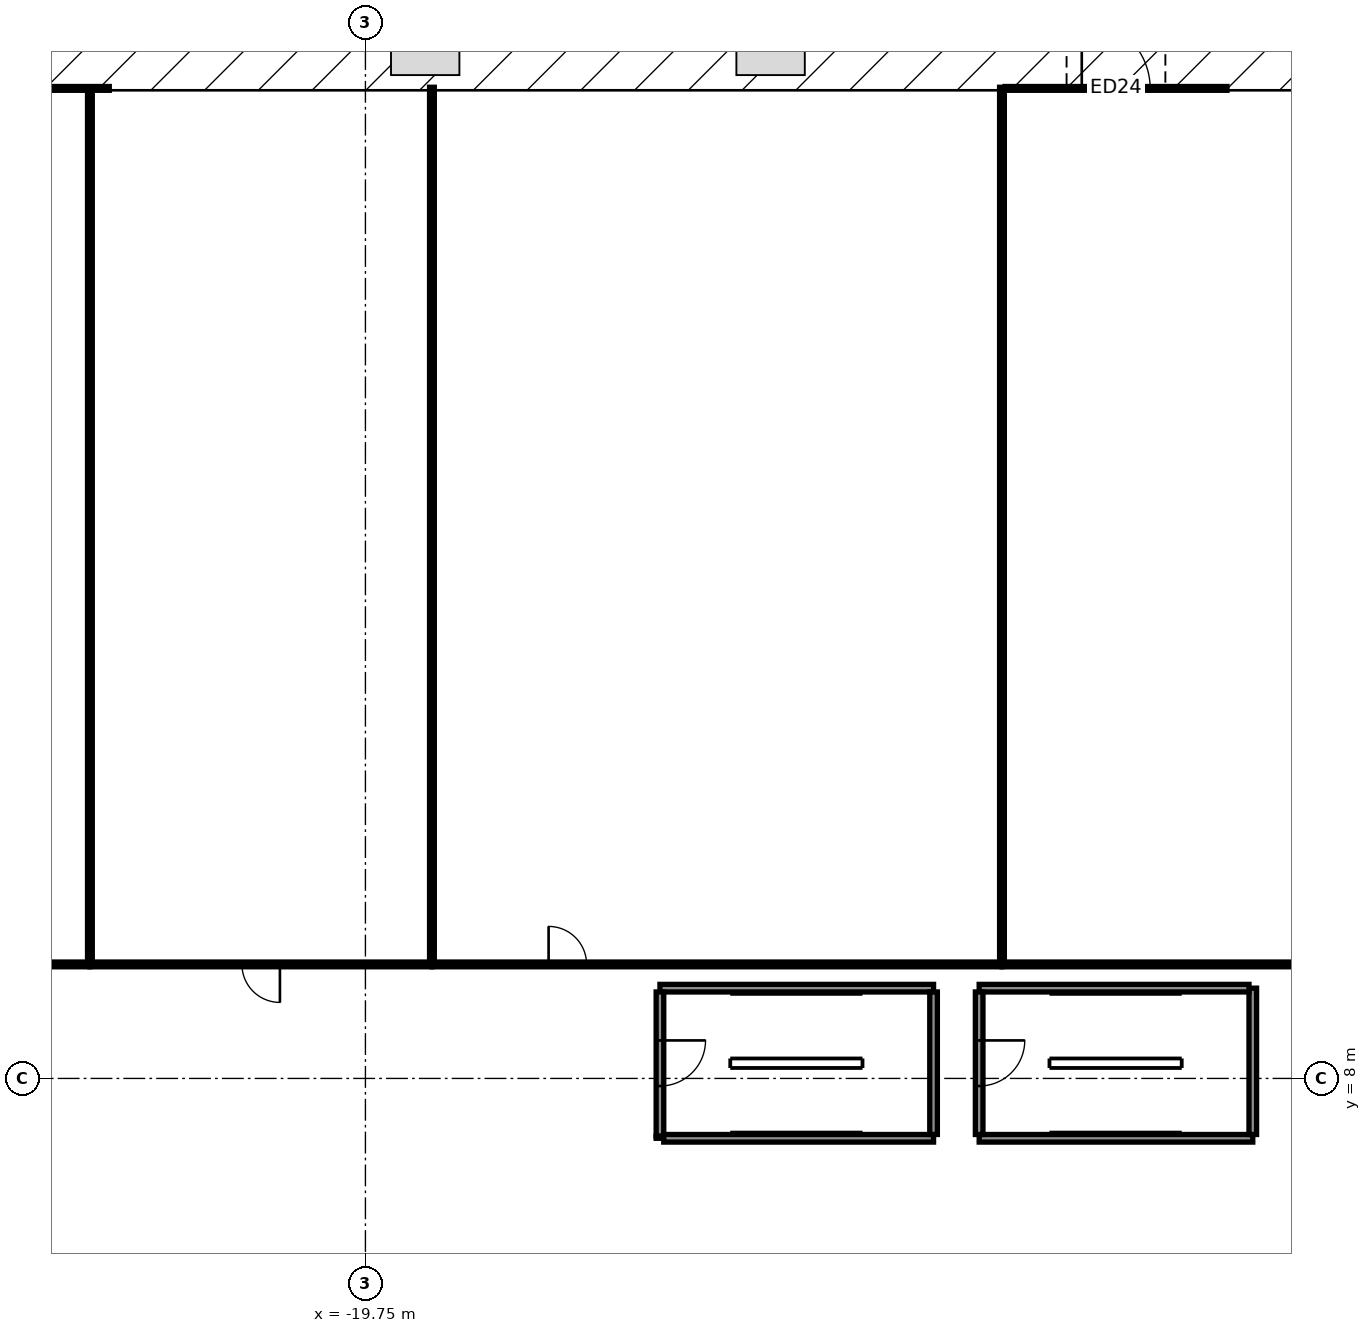
"""IFC4 building model, lengths in metres.
Left out: names, types, materials, properties, quantities, classifications, styles, units other than length and angle.
Written with IfcOpenShell. Run it as: python <this file> out.ifc"""

import sys

from ifc_helpers import new_model, si_unit, direction, frame, frame_2d, origin, origin_2d, place, context, subcontext, project, spatial, rectangle, hollow_rectangle, circle, extrude, element, fill, save


model = new_model("IFC4")
c1 = context("Model", 3, precision=1e-05, world=origin(), true_north=direction((0.0, 1.0)))
c2 = subcontext(c1, "Body", "Model", "MODEL_VIEW")
j1 = project(units=[si_unit("LENGTHUNIT", "METRE"), si_unit("PLANEANGLEUNIT", "RADIAN")], contexts=[c1])
p1 = place(None, origin())
s1 = spatial("IfcSite", under=j1, at=p1, CompositionType="ELEMENT")
p2 = place(p1, origin())
s2 = spatial("IfcBuilding", under=s1, at=p2, CompositionType="ELEMENT")
p3 = place(p2, frame((0.0, 0.0, 7.0)))
s3 = spatial("IfcBuildingStorey", under=s2, at=p3, CompositionType="ELEMENT", Elevation=7.0)
for number, where, z_axis, x_axis in (
    (1, (-21.0, 27.4, 0.0), (0.0, 0.0, 1.0), (1.0, 0.0, 0.0)),
    (2, (-4.2, 21.0, 0.0), (0.0, 0.0, 1.0), (1.0, 0.0, 0.0)),
    (3, (-4.2, 27.4, 0.0), (0.0, 0.0, 1.0), (1.0, 0.0, 0.0)),
    (4, (4.2, 4.2, 0.0), (0.0, 0.0, 1.0), (1.0, 0.0, 0.0)),
    (5, (4.2, 21.0, 0.0), (0.0, 0.0, 1.0), (1.0, 0.0, 0.0)),
    (6, (4.2, 27.4, 0.0), (0.0, 0.0, 1.0), (1.0, 0.0, 0.0)),
):
    element("IfcColumn", number, at=place(p3, frame(where, z_axis=z_axis, x_axis=x_axis)), inside=s3, PredefinedType="COLUMN", context=c2, shape_type="SweptSolid", body=[
        extrude(circle(Radius=0.6, at=origin_2d()), origin(), (0.0, 0.0, 1.0), 5.0),
    ])
for number, where, z_axis, x_axis in (
    (7, (-11.317, 11.797, 0.0), (0.0, 0.0, 1.0), (0.866, 0.5, 0.0)),
    (8, (-20.539, 19.418, 0.0), (0.0, 0.0, 1.0), (0.5, 0.866, 0.0)),
):
    element("IfcColumn", number, at=place(p3, frame(where, z_axis=z_axis, x_axis=x_axis)), inside=s3, PredefinedType="COLUMN", context=c2, shape_type="SweptSolid", body=[
        extrude(hollow_rectangle(XDim=1.5, YDim=1.5, WallThickness=0.07, at=origin_2d()), origin(), (0.0, 0.0, 1.0), 5.0),
    ])
p4 = place(p3, frame((-2.921, 34.05, 0.0), z_axis=(0.0, 0.0, 1.0), x_axis=(1.0, 0.0, 0.0)))
e9 = element("IfcWall", 9, at=p4, inside=s3, PredefinedType="STANDARD", context=c2, shape_type="SweptSolid", body=[
    extrude(rectangle(XDim=5.842, YDim=0.1, at=frame_2d((2.921, 0.0))), origin(), (0.0, 0.0, 1.0), 5.0),
])
p5 = place(p4, frame((2.021, 0.0, 0.0)))
e10 = element("IfcOpeningElement", 10, at=p5, cuts=e9, PredefinedType="OPENING", context=c2, shape_type="SweptSolid", body=[
    extrude(rectangle(XDim=1.8, YDim=2.4, at=frame_2d((0.9, 1.2))), frame((0.0, 0.06, 0.0), z_axis=(0.0, -1.0, 0.0), x_axis=(1.0, 0.0, 0.0)), (0.0, 0.0, 1.0), 0.12),
])
p6 = place(p3, frame((-32.333, 34.05, 0.0), z_axis=(0.0, 0.0, 1.0), x_axis=(1.0, 0.0, 0.0)))
e11 = element("IfcWall", 11, at=p6, inside=s3, PredefinedType="STANDARD", context=c2, shape_type="SweptSolid", body=[
    extrude(rectangle(XDim=5.843, YDim=0.1, at=frame_2d((2.921, 0.0))), origin(), (0.0, 0.0, 1.0), 5.0),
])
p7 = place(p6, frame((2.021, 0.0, 0.0)))
e12 = element("IfcOpeningElement", 12, at=p7, cuts=e11, PredefinedType="OPENING", context=c2, shape_type="SweptSolid", body=[
    extrude(rectangle(XDim=1.8, YDim=2.4, at=frame_2d((0.9, 1.2))), frame((0.0, 0.06, 0.0), z_axis=(0.0, -1.0, 0.0), x_axis=(1.0, 0.0, 0.0)), (0.0, 0.0, 1.0), 0.12),
])
p8 = place(p3, frame((-44.2, 8.0, 0.0), z_axis=(0.0, 0.0, 1.0), x_axis=(1.0, 0.0, 0.0)))
e13 = element("IfcWall", 13, at=p8, inside=s3, PredefinedType="SHEAR", context=c2, shape_type="SweptSolid", body=[
    extrude(rectangle(XDim=24.9, YDim=0.9, at=frame_2d((12.45, 0.0))), origin(), (0.0, 0.0, 1.0), 5.0),
])
p9 = place(p8, frame((10.5, 0.0, 0.0)))
e14 = element("IfcOpeningElement", 14, at=p9, cuts=e13, PredefinedType="OPENING", context=c2, shape_type="SweptSolid", body=[
    extrude(rectangle(XDim=1.1, YDim=2.1, at=frame_2d((0.55, 1.05))), frame((0.0, 0.46, 0.0), z_axis=(0.0, -1.0, 0.0), x_axis=(1.0, 0.0, 0.0)), (0.0, 0.0, 1.0), 0.92),
])
p10 = place(p8, frame((21.25, 0.0, 0.0)))
e15 = element("IfcOpeningElement", 15, at=p10, cuts=e13, PredefinedType="OPENING", context=c2, shape_type="SweptSolid", body=[
    extrude(rectangle(XDim=1.4, YDim=2.1, at=frame_2d((0.7, 1.05))), frame((0.0, 0.46, 0.0), z_axis=(0.0, -1.0, 0.0), x_axis=(1.0, 0.0, 0.0)), (0.0, 0.0, 1.0), 0.92),
])
p11 = place(p3, frame((-19.75, -8.0, 0.0), z_axis=(0.0, 0.0, 1.0), x_axis=(0.0, 1.0, 0.0)))
e16 = element("IfcWall", 16, at=p11, inside=s3, PredefinedType="SHEAR", context=c2, shape_type="SweptSolid", body=[
    extrude(rectangle(XDim=16.0, YDim=0.9, at=frame_2d((8.0, 0.0))), origin(), (0.0, 0.0, 1.0), 5.0),
])
p12 = place(p11, frame((7.1, 0.0, 0.0)))
e17 = element("IfcOpeningElement", 17, at=p12, cuts=e16, PredefinedType="OPENING", context=c2, shape_type="SweptSolid", body=[
    extrude(rectangle(XDim=1.8, YDim=2.1, at=frame_2d((0.9, 1.05))), frame((0.0, 0.46, 0.0), z_axis=(0.0, -1.0, 0.0), x_axis=(1.0, 0.0, 0.0)), (0.0, 0.0, 1.0), 0.92),
])
p13 = place(p3, frame((-43.3, 4.275, 0.0), z_axis=(0.0, 0.0, 1.0), x_axis=(1.0, 0.0, 0.0)))
e18 = element("IfcWall", 18, at=p13, inside=s3, PredefinedType="SHEAR", context=c2, shape_type="SweptSolid", body=[
    extrude(rectangle(XDim=23.1, YDim=0.25, at=frame_2d((11.55, 0.0))), origin(), (0.0, 0.0, 1.0), 5.0),
])
for number, where, z_axis, x_axis in (
    (19, (-27.858, 1.75, 0.0), (0.0, 0.0, 1.0), (0.0, 1.0, 0.0)),
    (20, (-25.264, 1.75, 0.0), (0.0, 0.0, 1.0), (0.0, 1.0, 0.0)),
    (21, (-22.669, 1.75, 0.0), (0.0, 0.0, 1.0), (0.0, 1.0, 0.0)),
):
    element("IfcWall", number, at=place(p3, frame(where, z_axis=z_axis, x_axis=x_axis)), inside=s3, PredefinedType="SHEAR", context=c2, shape_type="SweptSolid", body=[
        extrude(rectangle(XDim=2.4, YDim=0.25, at=frame_2d((1.2, 0.0))), origin(), (0.0, 0.0, 1.0), 5.0),
    ])
p14 = place(p3, frame((-27.575, 4.4, 0.0), z_axis=(0.0, 0.0, 1.0), x_axis=(0.0, 1.0, 0.0)))
e22 = element("IfcWall", 22, at=p14, inside=s3, PredefinedType="SHEAR", context=c2, shape_type="SweptSolid", body=[
    extrude(rectangle(XDim=3.15, YDim=0.25, at=frame_2d((1.575, 0.0))), origin(), (0.0, 0.0, 1.0), 5.0),
])
p15 = place(p3, frame((-24.425, 4.4, 0.0), z_axis=(0.0, 0.0, 1.0), x_axis=(0.0, 1.0, 0.0)))
e23 = element("IfcWall", 23, at=p15, inside=s3, PredefinedType="SHEAR", context=c2, shape_type="SweptSolid", body=[
    extrude(rectangle(XDim=3.15, YDim=0.25, at=frame_2d((1.575, 0.0))), origin(), (0.0, 0.0, 1.0), 5.0),
])
p16 = place(p15, frame((0.875, 0.0, 0.0)))
e24 = element("IfcOpeningElement", 24, at=p16, cuts=e23, PredefinedType="OPENING", context=c2, shape_type="SweptSolid", body=[
    extrude(rectangle(XDim=1.4, YDim=2.1, at=frame_2d((0.7, 1.05))), frame((0.0, 0.135, 0.0), z_axis=(0.0, -1.0, 0.0), x_axis=(1.0, 0.0, 0.0)), (0.0, 0.0, 1.0), 0.27),
])
p17 = place(p3, frame((-4.8, 10.375, 0.0), z_axis=(0.0, 0.0, 1.0), x_axis=(-1.0, 0.0, 0.0)))
e25 = element("IfcWall", 25, at=p17, inside=s3, PredefinedType="SOLIDWALL", context=c2, shape_type="SweptSolid", body=[
    extrude(rectangle(XDim=7.2, YDim=0.2, at=frame_2d((3.6, 0.0))), origin(), (0.0, 0.0, 1.0), 4.7),
])
p18 = place(p3, frame((-12.0, 10.275, 0.0), z_axis=(0.0, 0.0, 1.0), x_axis=(0.0, -1.0, 0.0)))
e26 = element("IfcWall", 26, at=p18, inside=s3, PredefinedType="SOLIDWALL", context=c2, shape_type="SweptSolid", body=[
    extrude(rectangle(XDim=3.795, YDim=0.2, at=frame_2d((1.897, 0.0))), origin(), (0.0, 0.0, 1.0), 4.7),
])
p19 = place(p18, frame((1.275, 0.0, 0.0)))
e27 = element("IfcOpeningElement", 27, at=p19, cuts=e26, PredefinedType="OPENING", context=c2, shape_type="SweptSolid", body=[
    extrude(rectangle(XDim=1.2, YDim=2.1, at=frame_2d((0.6, 1.05))), frame((0.0, 0.11, 0.0), z_axis=(0.0, -1.0, 0.0), x_axis=(1.0, 0.0, 0.0)), (0.0, 0.0, 1.0), 0.22),
])
p20 = place(p3, frame((-12.0, 6.48, 0.0), z_axis=(0.0, 0.0, 1.0), x_axis=(0.0, -1.0, 0.0)))
e28 = element("IfcWall", 28, at=p20, inside=s3, PredefinedType="SOLIDWALL", context=c2, shape_type="SweptSolid", body=[
    extrude(rectangle(XDim=0.055, YDim=0.2, at=frame_2d((0.028, 0.0))), origin(), (0.0, 0.0, 1.0), 3.996),
])
p21 = place(p3, frame((-11.9, 6.425, 0.0), z_axis=(0.0, 0.0, 1.0), x_axis=(1.0, 0.0, 0.0)))
e29 = element("IfcWall", 29, at=p21, inside=s3, PredefinedType="SOLIDWALL", context=c2, shape_type="SweptSolid", body=[
    extrude(rectangle(XDim=7.1, YDim=0.2, at=frame_2d((3.55, 0.0))), origin(), (0.0, 0.0, 1.0), 4.7),
])
p22 = place(p3, frame((-4.8, 6.525, 0.0), z_axis=(0.0, 0.0, 1.0), x_axis=(0.0, 1.0, 0.0)))
e30 = element("IfcWall", 30, at=p22, inside=s3, PredefinedType="SOLIDWALL", context=c2, shape_type="SweptSolid", body=[
    extrude(rectangle(XDim=3.75, YDim=0.2, at=frame_2d((1.875, 0.0))), origin(), (0.0, 0.0, 1.0), 4.7),
])
p23 = place(p3, frame((-3.6, 6.425, 0.0), z_axis=(0.0, 0.0, 1.0), x_axis=(1.0, 0.0, 0.0)))
e31 = element("IfcWall", 31, at=p23, inside=s3, PredefinedType="SOLIDWALL", context=c2, shape_type="SweptSolid", body=[
    extrude(rectangle(XDim=7.2, YDim=0.2, at=frame_2d((3.6, 0.0))), origin(), (0.0, 0.0, 1.0), 4.7),
])
p24 = place(p3, frame((3.6, 6.525, 0.0), z_axis=(0.0, 0.0, 1.0), x_axis=(0.0, 1.0, 0.0)))
e32 = element("IfcWall", 32, at=p24, inside=s3, PredefinedType="SOLIDWALL", context=c2, shape_type="SweptSolid", body=[
    extrude(rectangle(XDim=3.85, YDim=0.2, at=frame_2d((1.925, 0.0))), origin(), (0.0, 0.0, 1.0), 4.7),
])
p25 = place(p3, frame((3.5, 10.375, 0.0), z_axis=(0.0, 0.0, 1.0), x_axis=(-1.0, 0.0, 0.0)))
e33 = element("IfcWall", 33, at=p25, inside=s3, PredefinedType="SOLIDWALL", context=c2, shape_type="SweptSolid", body=[
    extrude(rectangle(XDim=7.1, YDim=0.2, at=frame_2d((3.55, 0.0))), origin(), (0.0, 0.0, 1.0), 4.7),
])
p26 = place(p3, frame((-3.6, 10.275, 0.0), z_axis=(0.0, 0.0, 1.0), x_axis=(0.0, -1.0, 0.0)))
e34 = element("IfcWall", 34, at=p26, inside=s3, PredefinedType="SOLIDWALL", context=c2, shape_type="SweptSolid", body=[
    extrude(rectangle(XDim=3.75, YDim=0.2, at=frame_2d((1.875, 0.0))), origin(), (0.0, 0.0, 1.0), 4.7),
])
p27 = place(p26, frame((1.275, 0.0, 0.0)))
e35 = element("IfcOpeningElement", 35, at=p27, cuts=e34, PredefinedType="OPENING", context=c2, shape_type="SweptSolid", body=[
    extrude(rectangle(XDim=1.2, YDim=2.1, at=frame_2d((0.6, 1.05))), frame((0.0, 0.11, 0.0), z_axis=(0.0, -1.0, 0.0), x_axis=(1.0, 0.0, 0.0)), (0.0, 0.0, 1.0), 0.22),
])
p28 = place(p3, frame((-27.0, 11.0, 0.0), z_axis=(0.0, 0.0, 1.0), x_axis=(-1.0, 0.0, 0.0)))
e36 = element("IfcWall", 36, at=p28, inside=s3, PredefinedType="PARTITIONING", context=c2, shape_type="SweptSolid", body=[
    extrude(rectangle(XDim=21.0, YDim=0.125, at=frame_2d((10.5, 0.0))), origin(), (0.0, 0.0, 1.0), 3.996),
])
p29 = place(p28, frame((12.865, 0.0, 0.0)))
e37 = element("IfcOpeningElement", 37, at=p29, cuts=e36, PredefinedType="OPENING", context=c2, shape_type="SweptSolid", body=[
    extrude(rectangle(XDim=1.0, YDim=2.1, at=frame_2d((0.5, 1.05))), frame((0.0, 0.073, 0.0), z_axis=(0.0, -1.0, 0.0), x_axis=(1.0, 0.0, 0.0)), (0.0, 0.0, 1.0), 0.145),
])
p30 = place(p3, frame((-18.0, 11.0, 0.0), z_axis=(0.0, 0.0, 1.0), x_axis=(-1.0, 0.0, 0.0)))
e38 = element("IfcWall", 38, at=p30, inside=s3, PredefinedType="PARTITIONING", context=c2, shape_type="SweptSolid", body=[
    extrude(rectangle(XDim=9.0, YDim=0.125, at=frame_2d((4.5, 0.0))), origin(), (0.0, 0.0, 1.0), 3.996),
])
p31 = place(p30, frame((4.0, 0.0, 0.0)))
e39 = element("IfcOpeningElement", 39, at=p31, cuts=e38, PredefinedType="OPENING", context=c2, shape_type="SweptSolid", body=[
    extrude(rectangle(XDim=1.0, YDim=2.1, at=frame_2d((0.5, 1.05))), frame((0.0, 0.073, 0.0), z_axis=(0.0, -1.0, 0.0), x_axis=(1.0, 0.0, 0.0)), (0.0, 0.0, 1.0), 0.145),
])
p32 = place(p3, frame((-3.0, 11.0, 0.0), z_axis=(0.0, 0.0, 1.0), x_axis=(-1.0, 0.0, 0.0)))
e40 = element("IfcWall", 40, at=p32, inside=s3, PredefinedType="PARTITIONING", context=c2, shape_type="SweptSolid", body=[
    extrude(rectangle(XDim=15.0, YDim=0.125, at=frame_2d((7.5, 0.0))), origin(), (0.0, 0.0, 1.0), 3.996),
])
p33 = place(p32, frame((10.93, 0.0, 0.0)))
e41 = element("IfcOpeningElement", 41, at=p33, cuts=e40, PredefinedType="OPENING", context=c2, shape_type="SweptSolid", body=[
    extrude(rectangle(XDim=1.0, YDim=2.1, at=frame_2d((0.5, 1.05))), frame((0.0, 0.073, 0.0), z_axis=(0.0, -1.0, 0.0), x_axis=(1.0, 0.0, 0.0)), (0.0, 0.0, 1.0), 0.145),
])
p34 = place(p3, frame((12.0, 11.0, 0.0), z_axis=(0.0, 0.0, 1.0), x_axis=(-1.0, 0.0, 0.0)))
e42 = element("IfcWall", 42, at=p34, inside=s3, PredefinedType="PARTITIONING", context=c2, shape_type="SweptSolid", body=[
    extrude(rectangle(XDim=15.0, YDim=0.125, at=frame_2d((7.5, 0.0))), origin(), (0.0, 0.0, 1.0), 3.762),
])
p35 = place(p34, frame((5.035, 0.0, 0.0)))
e43 = element("IfcOpeningElement", 43, at=p35, cuts=e42, PredefinedType="OPENING", context=c2, shape_type="SweptSolid", body=[
    extrude(rectangle(XDim=1.0, YDim=2.1, at=frame_2d((0.5, 1.05))), frame((0.0, 0.073, 0.0), z_axis=(0.0, -1.0, 0.0), x_axis=(1.0, 0.0, 0.0)), (0.0, 0.0, 1.0), 0.145),
])
for number, where, z_axis, x_axis in (
    (44, (-27.0, 11.062, 0.0), (0.0, 0.0, 1.0), (0.0, 1.0, 0.0)),
    (45, (-18.0, 11.062, 0.0), (0.0, 0.0, 1.0), (0.0, 1.0, 0.0)),
    (46, (-3.0, 11.062, 0.0), (0.0, 0.0, 1.0), (0.0, 1.0, 0.0)),
):
    element("IfcWall", number, at=place(p3, frame(where, z_axis=z_axis, x_axis=x_axis)), inside=s3, PredefinedType="PARTITIONING", context=c2, shape_type="SweptSolid", body=[
        extrude(rectangle(XDim=23.018, YDim=0.125, at=frame_2d((11.509, 0.0))), origin(), (0.0, 0.0, 1.0), 3.48),
    ])
p36 = place(p5, origin())
e47 = element("IfcDoor", 47, at=p36, inside=s3, OperationType="SINGLE_SWING_LEFT", PredefinedType="DOOR", context=c2, shape_type="SweptSolid", body=[
    extrude(rectangle(XDim=1.8, YDim=2.4, at=frame_2d((0.9, 1.2))), frame((0.0, 0.025, 0.0), z_axis=(0.0, -1.0, 0.0), x_axis=(1.0, 0.0, 0.0)), (0.0, 0.0, 1.0), 0.05),
])
fill(e10, e47)
p37 = place(p10, origin())
e48 = element("IfcDoor", 48, at=p37, inside=s3, OperationType="DOUBLE_DOOR_SINGLE_SWING", PredefinedType="DOOR", context=c2, shape_type="SweptSolid", body=[
    extrude(rectangle(XDim=1.4, YDim=2.1, at=frame_2d((0.7, 1.05))), frame((0.0, -0.4, 0.0), z_axis=(0.0, -1.0, 0.0), x_axis=(1.0, 0.0, 0.0)), (0.0, 0.0, 1.0), 0.05),
])
fill(e15, e48)
p38 = place(p16, origin())
e49 = element("IfcDoor", 49, at=p38, inside=s3, OperationType="DOUBLE_DOOR_SLIDING", PredefinedType="DOOR", context=c2, shape_type="SweptSolid", body=[
    extrude(rectangle(XDim=1.4, YDim=2.1, at=frame_2d((0.7, 1.05))), frame((0.0, 0.025, 0.0), z_axis=(0.0, -1.0, 0.0), x_axis=(1.0, 0.0, 0.0)), (0.0, 0.0, 1.0), 0.05),
])
fill(e24, e49)
p39 = place(p31, origin())
e50 = element("IfcDoor", 50, at=p39, inside=s3, OperationType="SINGLE_SWING_LEFT", PredefinedType="DOOR", context=c2, shape_type="SweptSolid", body=[
    extrude(rectangle(XDim=1.0, YDim=2.1, at=frame_2d((0.5, 1.05))), frame((0.0, 0.025, 0.0), z_axis=(0.0, -1.0, 0.0), x_axis=(1.0, 0.0, 0.0)), (0.0, 0.0, 1.0), 0.05),
])
fill(e39, e50)
p40 = place(p33, origin())
e51 = element("IfcDoor", 51, at=p40, inside=s3, OperationType="SINGLE_SWING_RIGHT", PredefinedType="DOOR", context=c2, shape_type="SweptSolid", body=[
    extrude(rectangle(XDim=1.0, YDim=2.1, at=frame_2d((0.5, 1.05))), frame((0.0, 0.025, 0.0), z_axis=(0.0, -1.0, 0.0), x_axis=(1.0, 0.0, 0.0)), (0.0, 0.0, 1.0), 0.05),
])
fill(e41, e51)
p41 = place(p19, frame((1.2, 0.0, 0.0), z_axis=(0.0, 0.0, 1.0), x_axis=(-1.0, 0.0, 0.0)))
e52 = element("IfcDoor", 52, at=p41, inside=s3, OperationType="SINGLE_SWING_LEFT", PredefinedType="DOOR", context=c2, shape_type="SweptSolid", body=[
    extrude(rectangle(XDim=1.2, YDim=2.1, at=frame_2d((0.6, 1.05))), frame((0.0, 0.025, 0.0), z_axis=(0.0, -1.0, 0.0), x_axis=(1.0, 0.0, 0.0)), (0.0, 0.0, 1.0), 0.05),
])
fill(e27, e52)
p42 = place(p27, frame((1.2, 0.0, 0.0), z_axis=(0.0, 0.0, 1.0), x_axis=(-1.0, 0.0, 0.0)))
e53 = element("IfcDoor", 53, at=p42, inside=s3, OperationType="SINGLE_SWING_LEFT", PredefinedType="DOOR", context=c2, shape_type="SweptSolid", body=[
    extrude(rectangle(XDim=1.2, YDim=2.1, at=frame_2d((0.6, 1.05))), frame((0.0, 0.025, 0.0), z_axis=(0.0, -1.0, 0.0), x_axis=(1.0, 0.0, 0.0)), (0.0, 0.0, 1.0), 0.05),
])
fill(e35, e53)
save(model, sys.argv[1])
